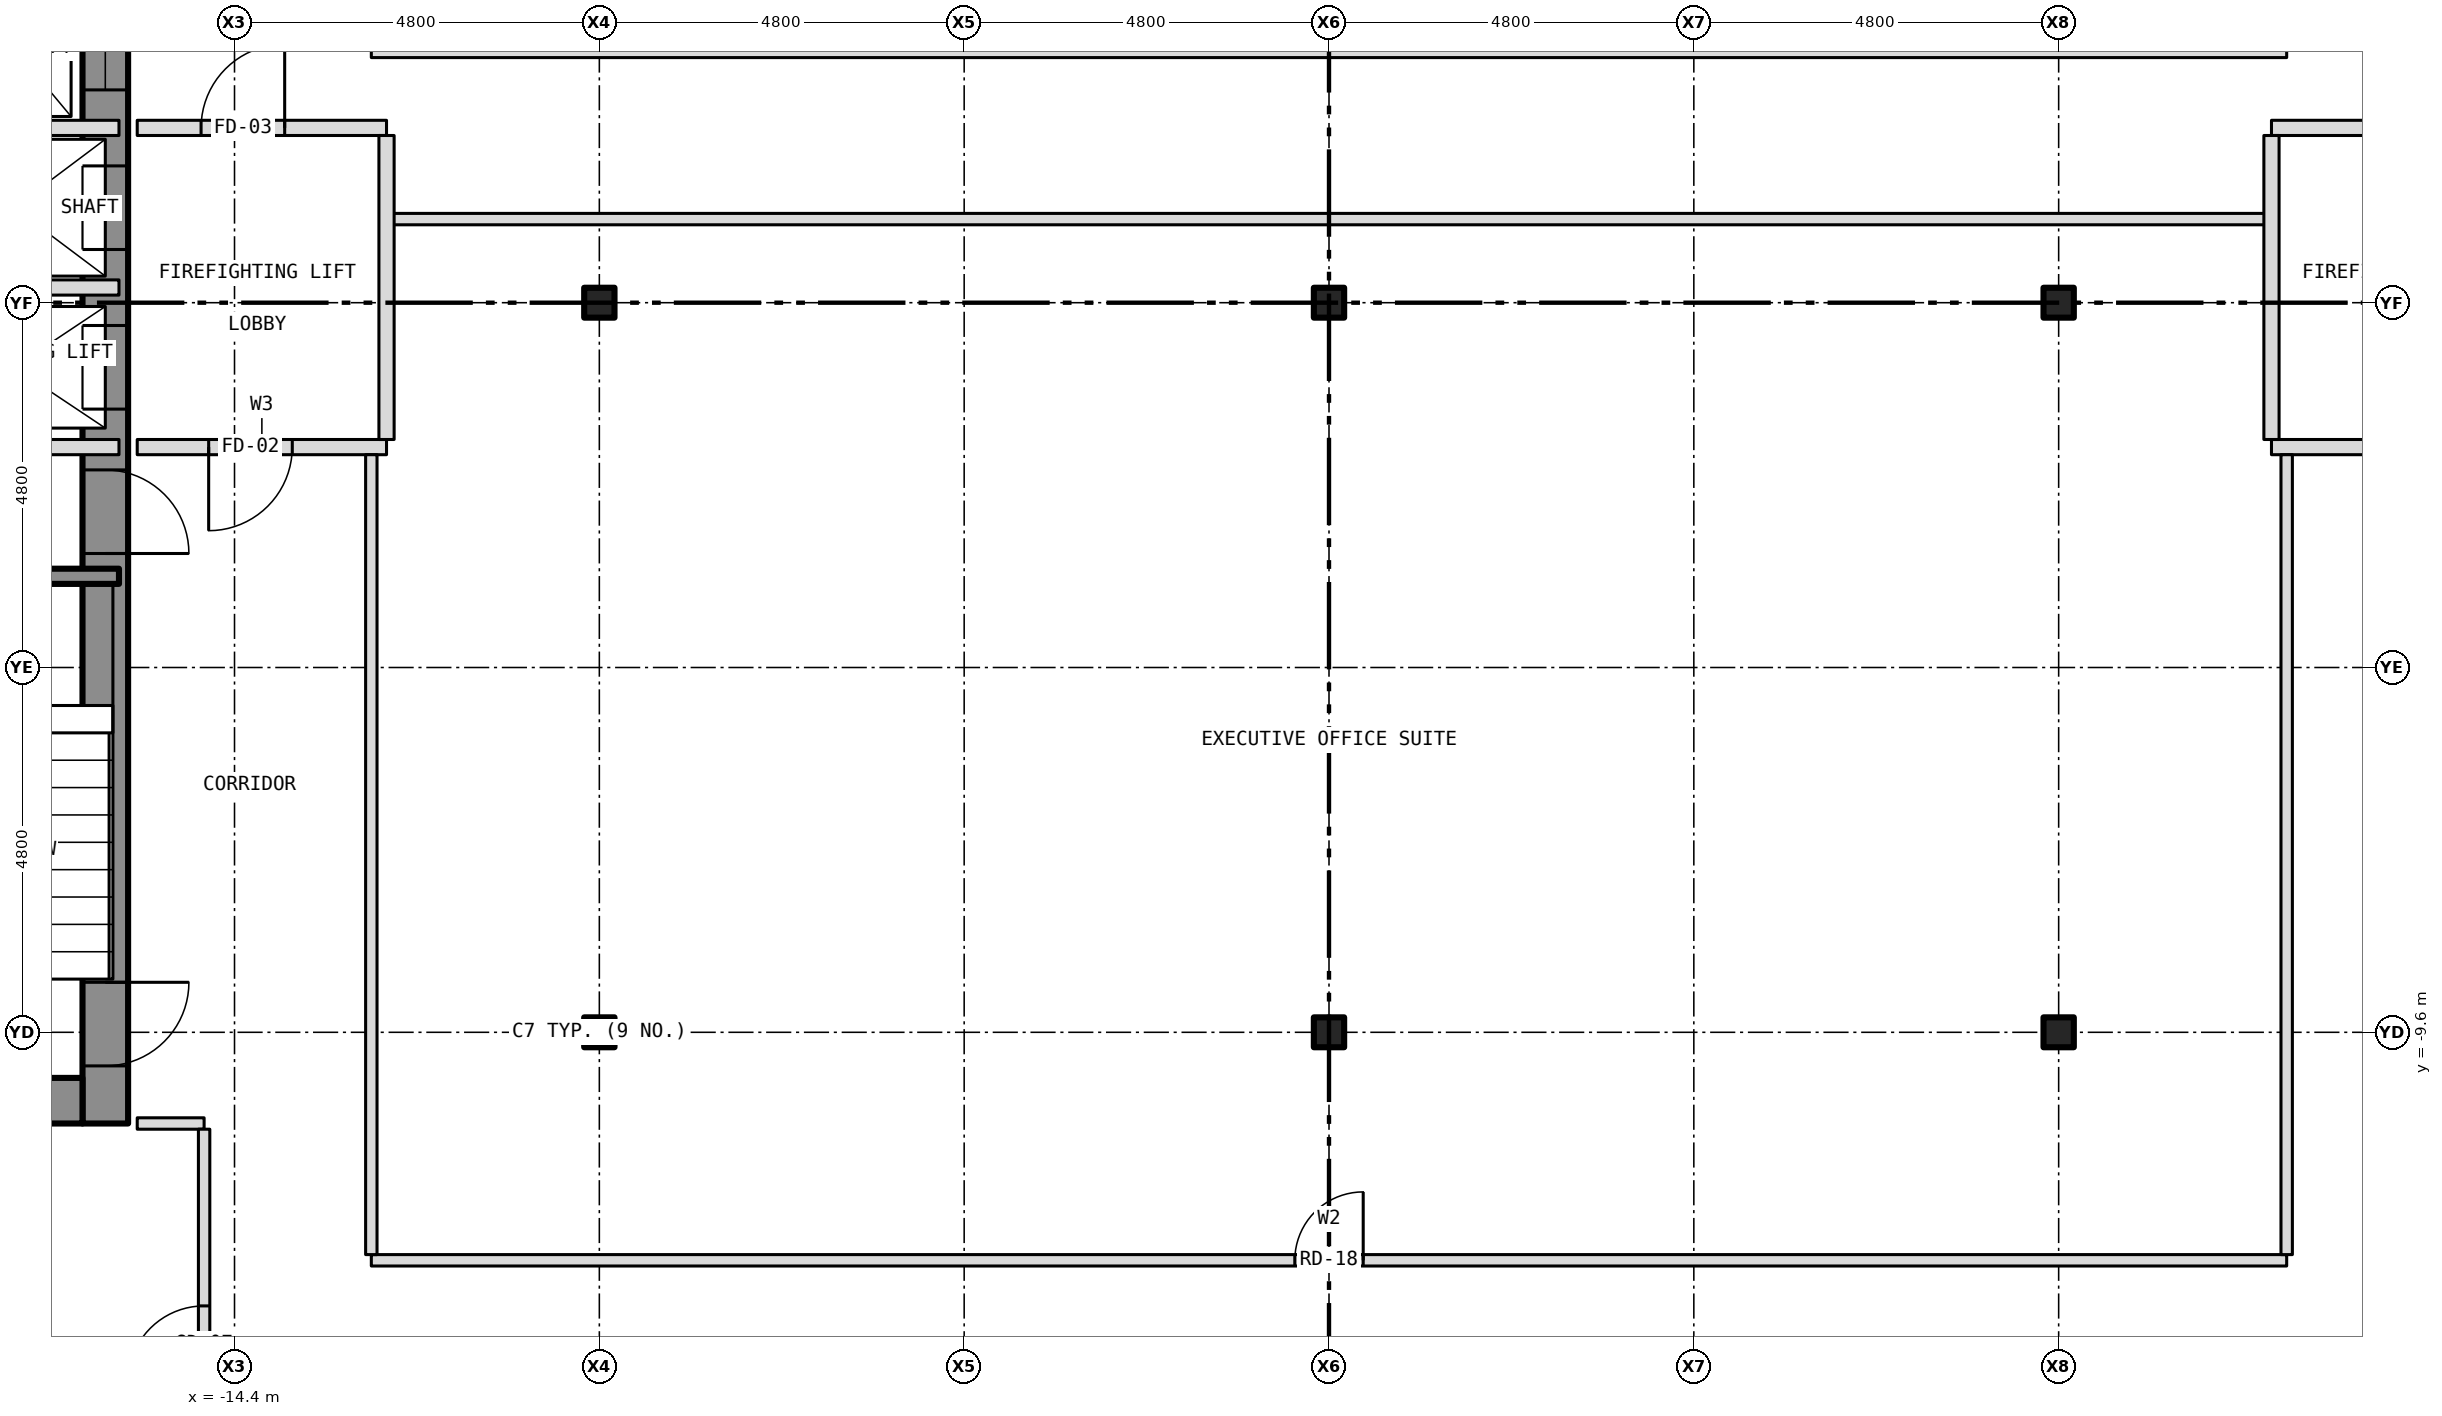
"""IFC4 building model, lengths in metres.
Left out: names, types, materials, properties, quantities, classifications, styles, units other than length and angle.
Written with IfcOpenShell. Run it as: python <this file> out.ifc"""

import sys

from ifc_helpers import new_model, si_unit, direction, frame, frame_2d, origin, origin_2d, place, context, subcontext, project, spatial, rectangle, i_section, extrude, element, fill, save


model = new_model("IFC4")
c1 = context("Model", 3, precision=1e-05, world=origin(), true_north=direction((0.0, 1.0)))
c2 = subcontext(c1, "Body", "Model", "MODEL_VIEW")
j1 = project(units=[si_unit("LENGTHUNIT", "METRE"), si_unit("PLANEANGLEUNIT", "RADIAN")], contexts=[c1])
p1 = place(None, origin())
s1 = spatial("IfcSite", under=j1, at=p1, CompositionType="ELEMENT")
p2 = place(p1, origin())
s2 = spatial("IfcBuilding", under=s1, at=p2, CompositionType="ELEMENT")
p3 = place(p2, frame((0.0, 0.0, 99.5)))
s3 = spatial("IfcBuildingStorey", under=s2, at=p3, CompositionType="ELEMENT", Elevation=99.5)
for number, where, z_axis, x_axis in (
    (1, (-9.6, -9.6, -0.15), (0.0, 0.0, 1.0), (1.0, 0.0, 0.0)),
    (2, (-9.6, 0.0, -0.15), (0.0, 0.0, 1.0), (1.0, 0.0, 0.0)),
    (3, (0.0, -9.6, -0.15), (0.0, 0.0, 1.0), (1.0, 0.0, 0.0)),
    (4, (0.0, 0.0, -0.15), (0.0, 0.0, 1.0), (1.0, 0.0, 0.0)),
    (5, (9.6, -9.6, -0.15), (0.0, 0.0, 1.0), (1.0, 0.0, 0.0)),
    (6, (9.6, 0.0, -0.15), (0.0, 0.0, 1.0), (1.0, 0.0, 0.0)),
):
    element("IfcColumn", number, at=place(p3, frame(where, z_axis=z_axis, x_axis=x_axis)), inside=s3, PredefinedType="COLUMN", context=c2, shape_type="SweptSolid", body=[
        extrude(i_section(OverallWidth=0.399, OverallDepth=0.394, WebThickness=0.023, FlangeThickness=0.037, at=origin_2d()), origin(), (0.0, 0.0, 1.0), 3.5),
    ])
p4 = place(p3, frame((-16.1, -10.8, 0.0), z_axis=(0.0, 0.0, 1.0), x_axis=(0.0, 1.0, 0.0)))
e7 = element("IfcWall", 7, at=p4, inside=s3, PredefinedType="SHEAR", context=c2, shape_type="SweptSolid", body=[
    extrude(rectangle(XDim=21.6, YDim=0.6, at=frame_2d((10.8, 0.0))), origin(), (0.0, 0.0, 1.0), 3.25),
])
p5 = place(p4, frame((9.4, 0.0, 0.0)))
e8 = element("IfcOpeningElement", 8, at=p5, cuts=e7, PredefinedType="OPENING", context=c2, shape_type="SweptSolid", body=[
    extrude(rectangle(XDim=1.1, YDim=2.1, at=frame_2d((0.55, 1.05))), frame((0.0, 0.312, 0.0), z_axis=(0.0, -1.0, 0.0), x_axis=(1.0, 0.0, 0.0)), (0.0, 0.0, 1.0), 0.624),
])
p6 = place(p4, frame((11.5, 0.0, 0.0)))
e9 = element("IfcOpeningElement", 9, at=p6, cuts=e7, PredefinedType="OPENING", context=c2, shape_type="SweptSolid", body=[
    extrude(rectangle(XDim=1.1, YDim=2.1, at=frame_2d((0.55, 1.05))), frame((0.0, 0.312, 0.0), z_axis=(0.0, -1.0, 0.0), x_axis=(1.0, 0.0, 0.0)), (0.0, 0.0, 1.0), 0.624),
])
p7 = place(p4, frame((13.6, 0.0, 0.0)))
e10 = element("IfcOpeningElement", 10, at=p7, cuts=e7, PredefinedType="OPENING", context=c2, shape_type="SweptSolid", body=[
    extrude(rectangle(XDim=1.1, YDim=2.1, at=frame_2d((0.55, 1.05))), frame((0.0, 0.312, 0.0), z_axis=(0.0, -1.0, 0.0), x_axis=(1.0, 0.0, 0.0)), (0.0, 0.0, 1.0), 0.624),
])
p8 = place(p4, frame((15.7, 0.0, 0.0)))
e11 = element("IfcOpeningElement", 11, at=p8, cuts=e7, PredefinedType="OPENING", context=c2, shape_type="SweptSolid", body=[
    extrude(rectangle(XDim=1.1, YDim=2.1, at=frame_2d((0.55, 1.05))), frame((0.0, 0.312, 0.0), z_axis=(0.0, -1.0, 0.0), x_axis=(1.0, 0.0, 0.0)), (0.0, 0.0, 1.0), 0.624),
])
p9 = place(p4, frame((17.8, 0.0, 0.0)))
e12 = element("IfcOpeningElement", 12, at=p9, cuts=e7, PredefinedType="OPENING", context=c2, shape_type="SweptSolid", body=[
    extrude(rectangle(XDim=1.1, YDim=2.1, at=frame_2d((0.55, 1.05))), frame((0.0, 0.312, 0.0), z_axis=(0.0, -1.0, 0.0), x_axis=(1.0, 0.0, 0.0)), (0.0, 0.0, 1.0), 0.624),
])
p10 = place(p4, frame((0.758, 0.0, 0.0)))
e13 = element("IfcOpeningElement", 13, at=p10, cuts=e7, PredefinedType="OPENING", context=c2, shape_type="SweptSolid", body=[
    extrude(rectangle(XDim=1.1, YDim=2.1, at=frame_2d((0.55, 1.05))), frame((0.0, 0.312, 0.0), z_axis=(0.0, -1.0, 0.0), x_axis=(1.0, 0.0, 0.0)), (0.0, 0.0, 1.0), 0.624),
])
p11 = place(p4, frame((7.5, 0.0, 0.0)))
e14 = element("IfcOpeningElement", 14, at=p11, cuts=e7, PredefinedType="OPENING", context=c2, shape_type="SweptSolid", body=[
    extrude(rectangle(XDim=1.1, YDim=2.1, at=frame_2d((0.55, 1.05))), frame((0.0, 0.312, 0.0), z_axis=(0.0, -1.0, 0.0), x_axis=(1.0, 0.0, 0.0)), (0.0, 0.0, 1.0), 0.624),
])
p12 = place(p3, frame((-22.2, -10.5, 0.0), z_axis=(0.0, 0.0, 1.0), x_axis=(1.0, 0.0, 0.0)))
e15 = element("IfcWall", 15, at=p12, inside=s3, PredefinedType="SHEAR", context=c2, shape_type="SweptSolid", body=[
    extrude(rectangle(XDim=5.8, YDim=0.6, at=frame_2d((2.9, 0.0))), origin(), (0.0, 0.0, 1.0), 3.25),
])
p13 = place(p3, frame((-12.6, -12.6, 0.0), z_axis=(0.0, 0.0, 1.0), x_axis=(1.0, 0.0, 0.0)))
e16 = element("IfcWall", 16, at=p13, inside=s3, PredefinedType="PARTITIONING", context=c2, shape_type="SweptSolid", body=[
    extrude(rectangle(XDim=25.2, YDim=0.15, at=frame_2d((12.6, 0.0))), origin(), (0.0, 0.0, 1.0), 3.35),
])
p14 = place(p13, frame((12.15, 0.0, 0.0)))
e17 = element("IfcOpeningElement", 17, at=p14, cuts=e16, PredefinedType="OPENING", context=c2, shape_type="SweptSolid", body=[
    extrude(rectangle(XDim=0.9, YDim=2.1, at=frame_2d((0.45, 1.05))), frame((0.0, 0.087, 0.0), z_axis=(0.0, -1.0, 0.0), x_axis=(1.0, 0.0, 0.0)), (0.0, 0.0, 1.0), 0.174),
])
p15 = place(p3, frame((-15.68, -10.8, 0.0), z_axis=(0.0, 0.0, 1.0), x_axis=(1.0, 0.0, 0.0)))
e18 = element("IfcWall", 18, at=p15, inside=s3, PredefinedType="PARTITIONING", context=c2, shape_type="SweptSolid", body=[
    extrude(rectangle(XDim=0.88, YDim=0.15, at=frame_2d((0.44, 0.0))), origin(), (0.0, 0.0, 1.0), 3.35),
])
p16 = place(p3, frame((-20.0, -3.6, 0.0), z_axis=(0.0, 0.0, 1.0), x_axis=(1.0, 0.0, 0.0)))
e19 = element("IfcWall", 19, at=p16, inside=s3, PredefinedType="SHEAR", context=c2, shape_type="SweptSolid", body=[
    extrude(rectangle(XDim=4.08, YDim=0.2, at=frame_2d((2.04, 0.0))), origin(), (0.0, 0.0, 1.0), 3.25),
])
p17 = place(p3, frame((-22.68, -1.9, 0.0), z_axis=(0.0, 0.0, 1.0), x_axis=(1.0, 0.0, 0.0)))
e20 = element("IfcWall", 20, at=p17, inside=s3, PredefinedType="PARTITIONING", context=c2, shape_type="SweptSolid", body=[
    extrude(rectangle(XDim=6.76, YDim=0.2, at=frame_2d((3.38, 0.0))), origin(), (0.0, 0.0, 1.0), 3.25),
])
p18 = place(p17, frame((2.12, 0.0, 0.0)))
e21 = element("IfcOpeningElement", 21, at=p18, cuts=e20, PredefinedType="OPENING", context=c2, shape_type="SweptSolid", body=[
    extrude(rectangle(XDim=0.9, YDim=2.1, at=frame_2d((0.45, 1.05))), frame((0.0, 0.112, 0.0), z_axis=(0.0, -1.0, 0.0), x_axis=(1.0, 0.0, 0.0)), (0.0, 0.0, 1.0), 0.224),
])
p19 = place(p3, frame((-15.68, -1.9, 0.0), z_axis=(0.0, 0.0, 1.0), x_axis=(1.0, 0.0, 0.0)))
e22 = element("IfcWall", 22, at=p19, inside=s3, PredefinedType="PARTITIONING", context=c2, shape_type="SweptSolid", body=[
    extrude(rectangle(XDim=3.28, YDim=0.2, at=frame_2d((1.64, 0.0))), origin(), (0.0, 0.0, 1.0), 3.35),
])
p20 = place(p19, frame((0.94, 0.0, 0.0)))
e23 = element("IfcOpeningElement", 23, at=p20, cuts=e22, PredefinedType="OPENING", context=c2, shape_type="SweptSolid", body=[
    extrude(rectangle(XDim=1.1, YDim=2.1, at=frame_2d((0.55, 1.05))), frame((0.0, 0.112, 0.0), z_axis=(0.0, -1.0, 0.0), x_axis=(1.0, 0.0, 0.0)), (0.0, 0.0, 1.0), 0.224),
])
p21 = place(p3, frame((12.4, -1.9, 0.0), z_axis=(0.0, 0.0, 1.0), x_axis=(1.0, 0.0, 0.0)))
e24 = element("IfcWall", 24, at=p21, inside=s3, PredefinedType="PARTITIONING", context=c2, shape_type="SweptSolid", body=[
    extrude(rectangle(XDim=3.28, YDim=0.2, at=frame_2d((1.64, 0.0))), origin(), (0.0, 0.0, 1.0), 3.35),
])
p22 = place(p21, frame((1.24, 0.0, 0.0)))
e25 = element("IfcOpeningElement", 25, at=p22, cuts=e24, PredefinedType="OPENING", context=c2, shape_type="SweptSolid", body=[
    extrude(rectangle(XDim=1.1, YDim=2.1, at=frame_2d((0.55, 1.05))), frame((0.0, 0.112, 0.0), z_axis=(0.0, -1.0, 0.0), x_axis=(1.0, 0.0, 0.0)), (0.0, 0.0, 1.0), 0.224),
])
p23 = place(p3, frame((-18.8, 0.2, 0.0), z_axis=(0.0, 0.0, 1.0), x_axis=(1.0, 0.0, 0.0)))
e26 = element("IfcWall", 26, at=p23, inside=s3, PredefinedType="PARTITIONING", context=c2, shape_type="SweptSolid", body=[
    extrude(rectangle(XDim=2.88, YDim=0.2, at=frame_2d((1.44, 0.0))), origin(), (0.0, 0.0, 1.0), 3.25),
])
p24 = place(p3, frame((-12.4, 1.1, 0.0), z_axis=(0.0, 0.0, 1.0), x_axis=(1.0, 0.0, 0.0)))
e27 = element("IfcWall", 27, at=p24, inside=s3, PredefinedType="PARTITIONING", context=c2, shape_type="SweptSolid", body=[
    extrude(rectangle(XDim=24.8, YDim=0.15, at=frame_2d((12.4, 0.0))), origin(), (0.0, 0.0, 1.0), 3.35),
])
p25 = place(p3, frame((-18.8, 2.3, 0.0), z_axis=(0.0, 0.0, 1.0), x_axis=(1.0, 0.0, 0.0)))
e28 = element("IfcWall", 28, at=p25, inside=s3, PredefinedType="PARTITIONING", context=c2, shape_type="SweptSolid", body=[
    extrude(rectangle(XDim=2.88, YDim=0.2, at=frame_2d((1.44, 0.0))), origin(), (0.0, 0.0, 1.0), 3.25),
])
p26 = place(p3, frame((-15.68, 2.3, 0.0), z_axis=(0.0, 0.0, 1.0), x_axis=(1.0, 0.0, 0.0)))
e29 = element("IfcWall", 29, at=p26, inside=s3, PredefinedType="PARTITIONING", context=c2, shape_type="SweptSolid", body=[
    extrude(rectangle(XDim=3.28, YDim=0.2, at=frame_2d((1.64, 0.0))), origin(), (0.0, 0.0, 1.0), 3.35),
])
p27 = place(p26, frame((0.84, 0.0, 0.0)))
e30 = element("IfcOpeningElement", 30, at=p27, cuts=e29, PredefinedType="OPENING", context=c2, shape_type="SweptSolid", body=[
    extrude(rectangle(XDim=1.1, YDim=2.1, at=frame_2d((0.55, 1.05))), frame((0.0, 0.112, 0.0), z_axis=(0.0, -1.0, 0.0), x_axis=(1.0, 0.0, 0.0)), (0.0, 0.0, 1.0), 0.224),
])
p28 = place(p3, frame((12.4, 2.3, 0.0), z_axis=(0.0, 0.0, 1.0), x_axis=(1.0, 0.0, 0.0)))
e31 = element("IfcWall", 31, at=p28, inside=s3, PredefinedType="PARTITIONING", context=c2, shape_type="SweptSolid", body=[
    extrude(rectangle(XDim=3.28, YDim=0.2, at=frame_2d((1.64, 0.0))), origin(), (0.0, 0.0, 1.0), 3.35),
])
p29 = place(p28, frame((1.34, 0.0, 0.0)))
e32 = element("IfcOpeningElement", 32, at=p29, cuts=e31, PredefinedType="OPENING", context=c2, shape_type="SweptSolid", body=[
    extrude(rectangle(XDim=1.1, YDim=2.1, at=frame_2d((0.55, 1.05))), frame((0.0, 0.112, 0.0), z_axis=(0.0, -1.0, 0.0), x_axis=(1.0, 0.0, 0.0)), (0.0, 0.0, 1.0), 0.224),
])
p30 = place(p3, frame((-12.6, 3.3, 0.0), z_axis=(0.0, 0.0, 1.0), x_axis=(1.0, 0.0, 0.0)))
e33 = element("IfcWall", 33, at=p30, inside=s3, PredefinedType="PARTITIONING", context=c2, shape_type="SweptSolid", body=[
    extrude(rectangle(XDim=25.2, YDim=0.15, at=frame_2d((12.6, 0.0))), origin(), (0.0, 0.0, 1.0), 3.35),
])
p31 = place(p3, frame((-14.8, -14.725, 0.0), z_axis=(0.0, 0.0, 1.0), x_axis=(0.0, 1.0, 0.0)))
e34 = element("IfcWall", 34, at=p31, inside=s3, PredefinedType="PARTITIONING", context=c2, shape_type="SweptSolid", body=[
    extrude(rectangle(XDim=3.85, YDim=0.15, at=frame_2d((1.925, 0.0))), origin(), (0.0, 0.0, 1.0), 3.35),
])
p32 = place(p31, frame((0.525, 0.0, 0.0)))
e35 = element("IfcOpeningElement", 35, at=p32, cuts=e34, PredefinedType="OPENING", context=c2, shape_type="SweptSolid", body=[
    extrude(rectangle(XDim=1.0, YDim=2.1, at=frame_2d((0.5, 1.05))), frame((0.0, 0.087, 0.0), z_axis=(0.0, -1.0, 0.0), x_axis=(1.0, 0.0, 0.0)), (0.0, 0.0, 1.0), 0.174),
])
p33 = place(p3, frame((-12.6, -12.525, 0.0), z_axis=(0.0, 0.0, 1.0), x_axis=(0.0, 1.0, 0.0)))
e36 = element("IfcWall", 36, at=p33, inside=s3, PredefinedType="PARTITIONING", context=c2, shape_type="SweptSolid", body=[
    extrude(rectangle(XDim=10.525, YDim=0.15, at=frame_2d((5.262, 0.0))), origin(), (0.0, 0.0, 1.0), 3.35),
])
for number, where, z_axis, x_axis in (
    (37, (-12.4, -1.8, 0.0), (0.0, 0.0, 1.0), (0.0, 1.0, 0.0)),
    (38, (12.4, -1.8, 0.0), (0.0, 0.0, 1.0), (0.0, 1.0, 0.0)),
):
    element("IfcWall", number, at=place(p3, frame(where, z_axis=z_axis, x_axis=x_axis)), inside=s3, PredefinedType="PARTITIONING", context=c2, shape_type="SweptSolid", body=[
        extrude(rectangle(XDim=4.0, YDim=0.2, at=frame_2d((2.0, 0.0))), origin(), (0.0, 0.0, 1.0), 3.35),
    ])
p34 = place(p3, frame((12.6, -12.525, 0.0), z_axis=(0.0, 0.0, 1.0), x_axis=(0.0, 1.0, 0.0)))
e39 = element("IfcWall", 39, at=p34, inside=s3, PredefinedType="PARTITIONING", context=c2, shape_type="SweptSolid", body=[
    extrude(rectangle(XDim=10.525, YDim=0.15, at=frame_2d((5.262, 0.0))), origin(), (0.0, 0.0, 1.0), 3.35),
])
p35 = place(p5, origin())
e40 = element("IfcDoor", 40, at=p35, inside=s3, OperationType="SLIDING_TO_LEFT", PredefinedType="DOOR", context=c2, shape_type="SweptSolid", body=[
    extrude(rectangle(XDim=1.1, YDim=2.1, at=frame_2d((0.55, 1.05))), frame((0.0, 0.025, 0.0), z_axis=(0.0, -1.0, 0.0), x_axis=(1.0, 0.0, 0.0)), (0.0, 0.0, 1.0), 0.05),
])
fill(e8, e40)
p36 = place(p6, origin())
e41 = element("IfcDoor", 41, at=p36, inside=s3, OperationType="SLIDING_TO_LEFT", PredefinedType="DOOR", context=c2, shape_type="SweptSolid", body=[
    extrude(rectangle(XDim=1.1, YDim=2.1, at=frame_2d((0.55, 1.05))), frame((0.0, 0.025, 0.0), z_axis=(0.0, -1.0, 0.0), x_axis=(1.0, 0.0, 0.0)), (0.0, 0.0, 1.0), 0.05),
])
fill(e9, e41)
p37 = place(p7, origin())
e42 = element("IfcDoor", 42, at=p37, inside=s3, OperationType="SLIDING_TO_LEFT", PredefinedType="DOOR", context=c2, shape_type="SweptSolid", body=[
    extrude(rectangle(XDim=1.1, YDim=2.1, at=frame_2d((0.55, 1.05))), frame((0.0, 0.025, 0.0), z_axis=(0.0, -1.0, 0.0), x_axis=(1.0, 0.0, 0.0)), (0.0, 0.0, 1.0), 0.05),
])
fill(e10, e42)
p38 = place(p10, origin())
e43 = element("IfcDoor", 43, at=p38, inside=s3, OperationType="SINGLE_SWING_RIGHT", PredefinedType="DOOR", context=c2, shape_type="SweptSolid", body=[
    extrude(rectangle(XDim=1.1, YDim=2.1, at=frame_2d((0.55, 1.05))), frame((0.0, 0.025, 0.0), z_axis=(0.0, -1.0, 0.0), x_axis=(1.0, 0.0, 0.0)), (0.0, 0.0, 1.0), 0.05),
])
fill(e13, e43)
p39 = place(p11, origin())
e44 = element("IfcDoor", 44, at=p39, inside=s3, OperationType="SINGLE_SWING_LEFT", PredefinedType="DOOR", context=c2, shape_type="SweptSolid", body=[
    extrude(rectangle(XDim=1.1, YDim=2.1, at=frame_2d((0.55, 1.05))), frame((0.0, 0.025, 0.0), z_axis=(0.0, -1.0, 0.0), x_axis=(1.0, 0.0, 0.0)), (0.0, 0.0, 1.0), 0.05),
])
fill(e14, e44)
p40 = place(p20, origin())
e45 = element("IfcDoor", 45, at=p40, inside=s3, OperationType="SINGLE_SWING_LEFT", PredefinedType="DOOR", context=c2, shape_type="SweptSolid", body=[
    extrude(rectangle(XDim=1.1, YDim=2.1, at=frame_2d((0.55, 1.05))), frame((0.0, 0.025, 0.0), z_axis=(0.0, -1.0, 0.0), x_axis=(1.0, 0.0, 0.0)), (0.0, 0.0, 1.0), 0.05),
])
fill(e23, e45)
p41 = place(p27, origin())
e46 = element("IfcDoor", 46, at=p41, inside=s3, OperationType="SINGLE_SWING_RIGHT", PredefinedType="DOOR", context=c2, shape_type="SweptSolid", body=[
    extrude(rectangle(XDim=1.1, YDim=2.1, at=frame_2d((0.55, 1.05))), frame((0.0, 0.025, 0.0), z_axis=(0.0, -1.0, 0.0), x_axis=(1.0, 0.0, 0.0)), (0.0, 0.0, 1.0), 0.05),
])
fill(e30, e46)
p42 = place(p32, origin())
e47 = element("IfcDoor", 47, at=p42, inside=s3, OperationType="SINGLE_SWING_LEFT", PredefinedType="DOOR", context=c2, shape_type="SweptSolid", body=[
    extrude(rectangle(XDim=1.0, YDim=2.1, at=frame_2d((0.5, 1.05))), frame((0.0, 0.025, 0.0), z_axis=(0.0, -1.0, 0.0), x_axis=(1.0, 0.0, 0.0)), (0.0, 0.0, 1.0), 0.05),
])
fill(e35, e47)
p43 = place(p14, origin())
e48 = element("IfcDoor", 48, at=p43, inside=s3, OperationType="SINGLE_SWING_RIGHT", PredefinedType="DOOR", context=c2, shape_type="SweptSolid", body=[
    extrude(rectangle(XDim=0.9, YDim=2.1, at=frame_2d((0.45, 1.05))), frame((0.0, 0.025, 0.0), z_axis=(0.0, -1.0, 0.0), x_axis=(1.0, 0.0, 0.0)), (0.0, 0.0, 1.0), 0.05),
])
fill(e17, e48)
save(model, sys.argv[1])
